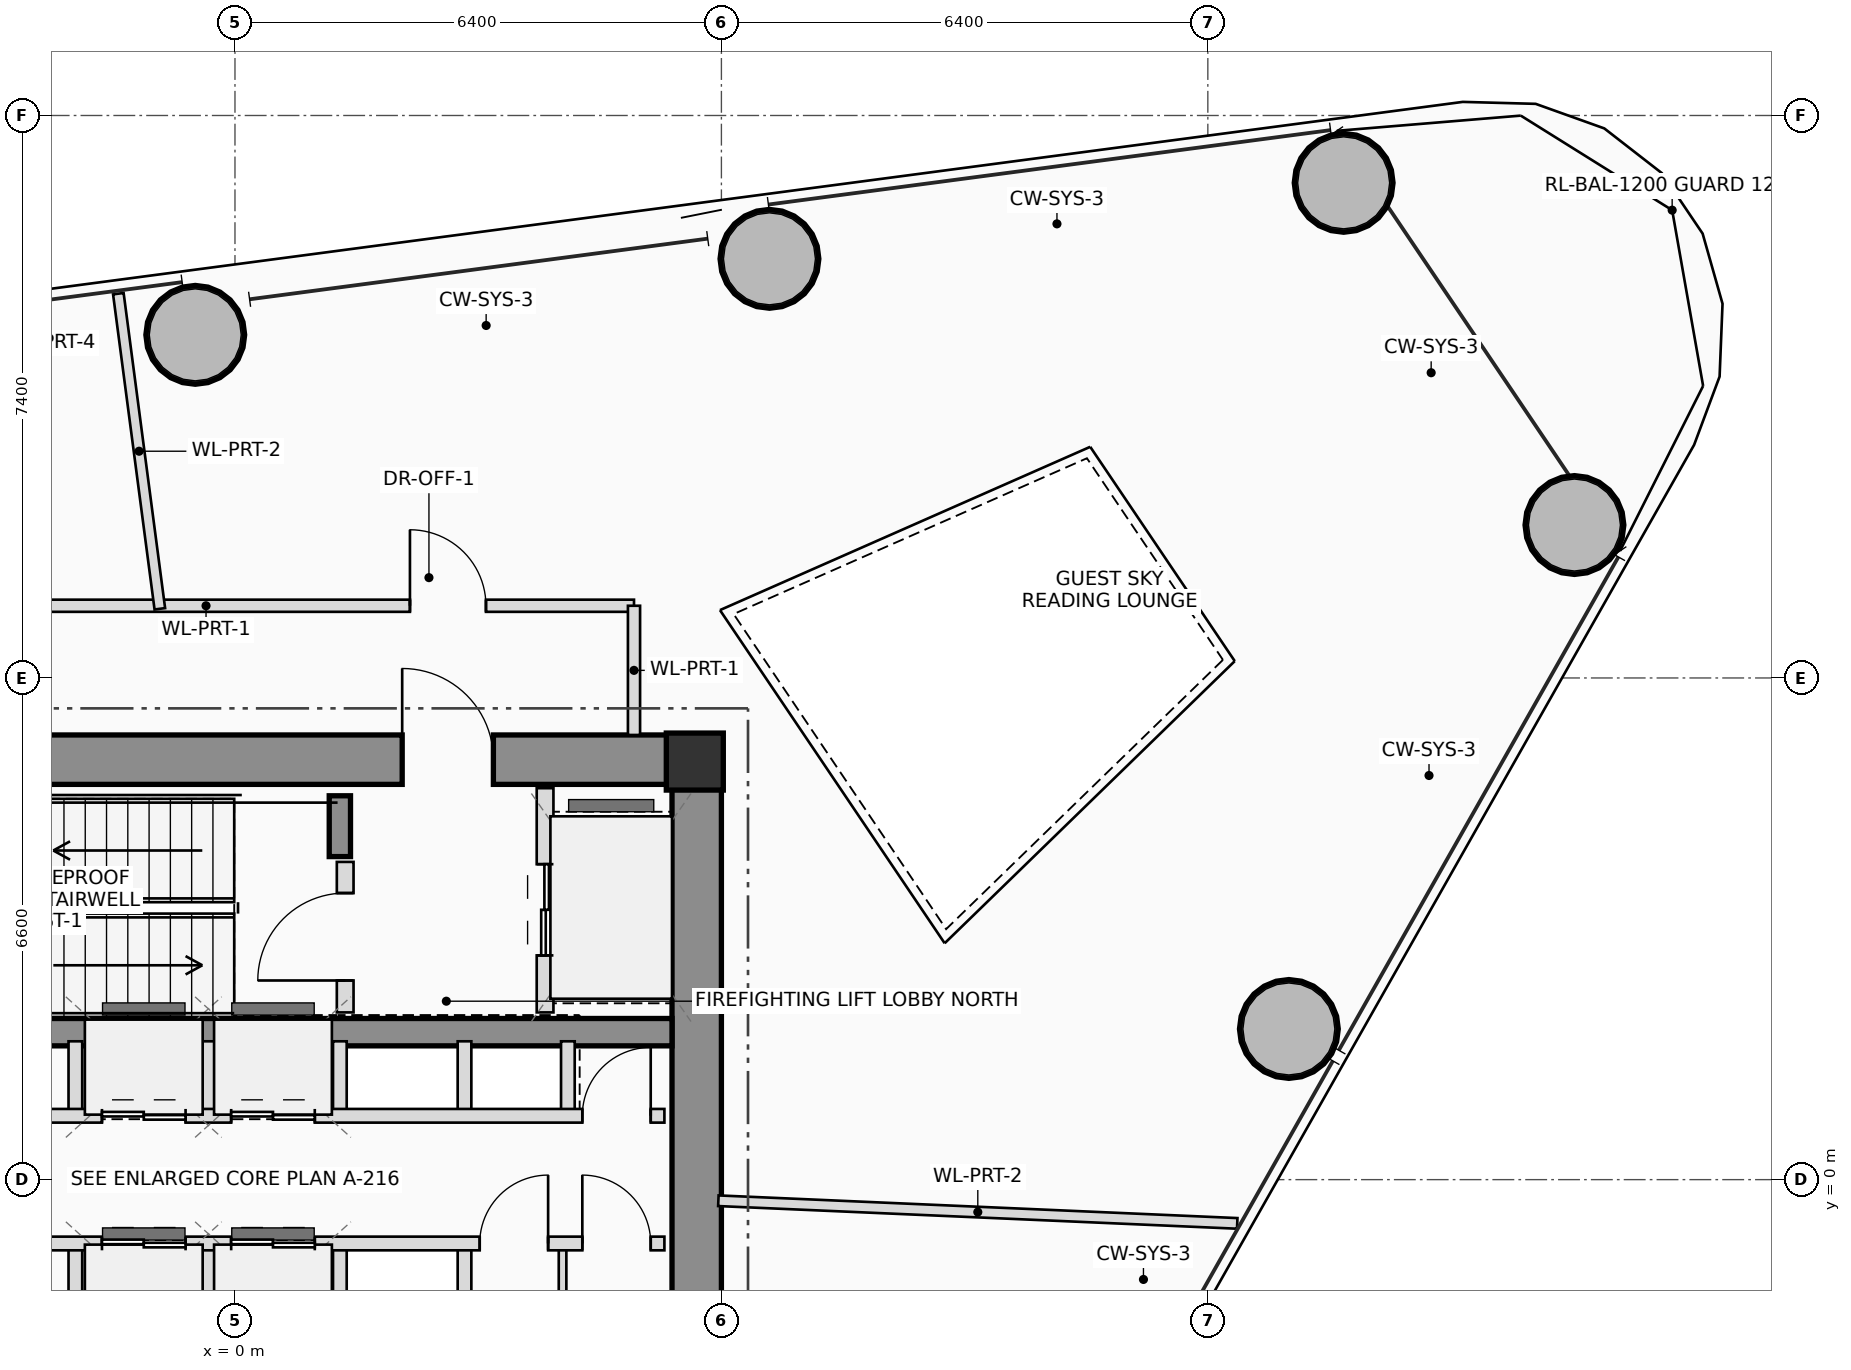
"""IFC4 building model, lengths in metres.
Left out: names, types, materials, properties, quantities, classifications, styles, units other than length and angle.
Written with IfcOpenShell. Run it as: python <this file> out.ifc"""

import sys

from ifc_helpers import new_model, si_unit, direction, frame, frame_2d, origin, origin_2d, place, context, subcontext, project, spatial, rectangle, hollow_circle, extrude, source, transform, mapped, element, fill, save


model = new_model("IFC4")
c1 = context("Model", 3, precision=1e-05, world=origin(), true_north=direction((0.0, 1.0)))
c2 = subcontext(c1, "Body", "Model", "MODEL_VIEW")
j1 = project(units=[si_unit("LENGTHUNIT", "METRE"), si_unit("PLANEANGLEUNIT", "RADIAN")], contexts=[c1])
p1 = place(None, origin())
s1 = spatial("IfcSite", under=j1, at=p1, CompositionType="ELEMENT")
p2 = place(p1, origin())
s2 = spatial("IfcBuilding", under=s1, at=p2, CompositionType="ELEMENT")
p3 = place(p2, frame((0.0, 0.0, 176.0)))
s3 = spatial("IfcBuildingStorey", under=s2, at=p3, CompositionType="ELEMENT", Elevation=176.0)
m1 = source(origin(), c2, "Body", "SweptSolid", [
    extrude(rectangle(XDim=0.75, YDim=0.75, at=origin_2d()), origin(), (0.0, 0.0, 1.0), 3.45),
])
p4 = place(p3, frame((6.05, 5.5, 0.0), z_axis=(0.0, 0.0, 1.0), x_axis=(1.0, 0.0, 0.0)))
e1 = element("IfcColumn", 1, at=p4, inside=s3, PredefinedType="COLUMN", context=c2, shape_type="MappedRepresentation", body=[
    mapped(m1, transform((0.0, 0.0, 0.0), scale=1.0)),
])
p5 = place(p3, frame((-6.4, 5.525, 0.0), z_axis=(0.0, 0.0, 1.0), x_axis=(1.0, 0.0, 0.0)))
e2 = element("IfcWall", 2, at=p5, inside=s3, PredefinedType="SHEAR", context=c2, shape_type="SweptSolid", body=[
    extrude(rectangle(XDim=12.8, YDim=0.65, at=frame_2d((6.4, 0.0))), origin(), (0.0, 0.0, 1.0), 3.45),
])
p6 = place(p5, frame((8.6, 0.0, 0.0)))
e3 = element("IfcOpeningElement", 3, at=p6, cuts=e2, PredefinedType="OPENING", context=c2, shape_type="SweptSolid", body=[
    extrude(rectangle(XDim=1.2, YDim=2.2, at=frame_2d((0.6, 1.1))), frame((0.0, 0.335, 0.0), z_axis=(0.0, -1.0, 0.0), x_axis=(1.0, 0.0, 0.0)), (0.0, 0.0, 1.0), 0.67),
])
p7 = place(p3, frame((6.075, -5.2, 0.0), z_axis=(0.0, 0.0, 1.0), x_axis=(0.0, 1.0, 0.0)))
e4 = element("IfcWall", 4, at=p7, inside=s3, PredefinedType="SHEAR", context=c2, shape_type="SweptSolid", body=[
    extrude(rectangle(XDim=10.4, YDim=0.65, at=frame_2d((5.2, 0.0))), origin(), (0.0, 0.0, 1.0), 3.45),
])
p8 = place(p3, frame((-5.75, 1.94, 0.0), z_axis=(0.0, 0.0, 1.0), x_axis=(1.0, 0.0, 0.0)))
e5 = element("IfcWall", 5, at=p8, inside=s3, PredefinedType="SHEAR", context=c2, shape_type="SweptSolid", body=[
    extrude(rectangle(XDim=11.5, YDim=0.36, at=frame_2d((5.75, 0.0))), origin(), (0.0, 0.0, 1.0), 3.45),
])
p9 = place(p3, frame((1.38, 4.25, 0.0), z_axis=(0.0, 0.0, 1.0), x_axis=(0.0, 1.0, 0.0)))
e6 = element("IfcWall", 6, at=p9, inside=s3, PredefinedType="SHEAR", context=c2, shape_type="SweptSolid", body=[
    extrude(rectangle(XDim=0.8, YDim=0.28, at=frame_2d((0.4, 0.0))), origin(), (0.0, 0.0, 1.0), 3.45),
])
m2 = source(origin(), c2, "Body", "SweptSolid", [
    extrude(hollow_circle(Radius=0.65, WallThickness=0.045, at=origin_2d()), origin(), (0.0, 0.0, 1.0), 3.45),
])
for number, where, z_axis, x_axis in (
    (7, (13.866, 1.982, 0.0), (0.0, 0.0, 1.0), (1.0, 0.0, 0.0)),
    (8, (17.624, 8.612, 0.0), (0.0, 0.0, 1.0), (1.0, 0.0, 0.0)),
    (9, (14.587, 13.114, 0.0), (0.0, 0.0, 1.0), (1.0, 0.0, 0.0)),
    (10, (7.032, 12.114, 0.0), (0.0, 0.0, 1.0), (1.0, 0.0, 0.0)),
    (11, (-0.522, 11.114, 0.0), (0.0, 0.0, 1.0), (1.0, 0.0, 0.0)),
):
    element("IfcColumn", number, at=place(p3, frame(where, z_axis=z_axis, x_axis=x_axis)), inside=s3, PredefinedType="COLUMN", context=c2, shape_type="MappedRepresentation", body=[
        mapped(m2, transform((0.0, 0.0, 0.0), scale=1.0)),
    ])
p10 = place(p3, frame((1.45, 2.2, 0.0), z_axis=(0.0, 0.0, 1.0), x_axis=(0.0, 1.0, 0.0)))
e12 = element("IfcWall", 12, at=p10, inside=s3, PredefinedType="PLUMBINGWALL", context=c2, shape_type="SweptSolid", body=[
    extrude(rectangle(XDim=1.98, YDim=0.22, at=frame_2d((0.99, 0.0))), origin(), (0.0, 0.0, 1.0), 3.25),
])
p11 = place(p10, frame((0.42, 0.0, 0.0)))
e13 = element("IfcOpeningElement", 13, at=p11, cuts=e12, PredefinedType="OPENING", context=c2, shape_type="SweptSolid", body=[
    extrude(rectangle(XDim=1.15, YDim=2.15, at=frame_2d((0.575, 1.075))), frame((0.0, 0.12, 0.0), z_axis=(0.0, -1.0, 0.0), x_axis=(1.0, 0.0, 0.0)), (0.0, 0.0, 1.0), 0.24),
])
p12 = place(p3, frame((4.08, 2.2, 0.0), z_axis=(0.0, 0.0, 1.0), x_axis=(0.0, 1.0, 0.0)))
e14 = element("IfcWall", 14, at=p12, inside=s3, PredefinedType="PLUMBINGWALL", context=c2, shape_type="SweptSolid", body=[
    extrude(rectangle(XDim=2.95, YDim=0.22, at=frame_2d((1.475, 0.0))), origin(), (0.0, 0.0, 1.0), 3.25),
])
p13 = place(p12, frame((0.75, 0.0, 0.0)))
e15 = element("IfcOpeningElement", 15, at=p13, cuts=e14, PredefinedType="OPENING", context=c2, shape_type="SweptSolid", body=[
    extrude(rectangle(XDim=1.2, YDim=2.25, at=frame_2d((0.6, 1.125))), frame((0.0, 0.12, 0.0), z_axis=(0.0, -1.0, 0.0), x_axis=(1.0, 0.0, 0.0)), (0.0, 0.0, 1.0), 0.24),
])
for number, where, z_axis, x_axis in (
    (16, (-2.1, 0.84, 0.0), (0.0, 0.0, 1.0), (0.0, 1.0, 0.0)),
    (17, (-2.1, -1.82, 0.0), (0.0, 0.0, 1.0), (0.0, 1.0, 0.0)),
    (18, (-0.35, 0.84, 0.0), (0.0, 0.0, 1.0), (0.0, 1.0, 0.0)),
    (19, (-0.35, -1.82, 0.0), (0.0, 0.0, 1.0), (0.0, 1.0, 0.0)),
    (20, (1.38, 0.84, 0.0), (0.0, 0.0, 1.0), (0.0, 1.0, 0.0)),
    (21, (1.38, -1.82, 0.0), (0.0, 0.0, 1.0), (0.0, 1.0, 0.0)),
    (22, (3.02, 0.84, 0.0), (0.0, 0.0, 1.0), (0.0, 1.0, 0.0)),
    (23, (4.38, 0.84, 0.0), (0.0, 0.0, 1.0), (0.0, 1.0, 0.0)),
    (24, (3.02, -1.82, 0.0), (0.0, 0.0, 1.0), (0.0, 1.0, 0.0)),
):
    element("IfcWall", number, at=place(p3, frame(where, z_axis=z_axis, x_axis=x_axis)), inside=s3, PredefinedType="PLUMBINGWALL", context=c2, shape_type="SweptSolid", body=[
        extrude(rectangle(XDim=0.98, YDim=0.18, at=frame_2d((0.49, 0.0))), origin(), (0.0, 0.0, 1.0), 3.25),
    ])
p14 = place(p3, frame((4.31, -1.82, 0.0), z_axis=(0.0, 0.0, 1.0), x_axis=(0.0, 1.0, 0.0)))
e25 = element("IfcWall", 25, at=p14, inside=s3, PredefinedType="PARTITIONING", context=c2, shape_type="SweptSolid", body=[
    extrude(rectangle(XDim=0.98, YDim=0.1, at=frame_2d((0.49, 0.0))), origin(), (0.0, 0.0, 1.0), 3.25),
])
p15 = place(p3, frame((-5.68, 0.84, 0.0), z_axis=(0.0, 0.0, 1.0), x_axis=(1.0, 0.0, 0.0)))
e26 = element("IfcWall", 26, at=p15, inside=s3, PredefinedType="PLUMBINGWALL", context=c2, shape_type="SweptSolid", body=[
    extrude(rectangle(XDim=11.33, YDim=0.18, at=frame_2d((5.665, 0.0))), origin(), (0.0, 0.0, 1.0), 3.25),
])
p16 = place(p15, frame((1.58, 0.0, 0.0)))
e27 = element("IfcOpeningElement", 27, at=p16, cuts=e26, PredefinedType="OPENING", context=c2, shape_type="SweptSolid", body=[
    extrude(rectangle(XDim=0.92, YDim=2.1, at=frame_2d((0.46, 1.05))), frame((0.0, 0.1, 0.0), z_axis=(0.0, -1.0, 0.0), x_axis=(1.0, 0.0, 0.0)), (0.0, 0.0, 1.0), 0.2),
])
p17 = place(p15, frame((3.93, 0.0, 0.0)))
e28 = element("IfcOpeningElement", 28, at=p17, cuts=e26, PredefinedType="OPENING", context=c2, shape_type="SweptSolid", body=[
    extrude(rectangle(XDim=1.1, YDim=2.2, at=frame_2d((0.55, 1.1))), frame((0.0, 0.1, 0.0), z_axis=(0.0, -1.0, 0.0), x_axis=(1.0, 0.0, 0.0)), (0.0, 0.0, 1.0), 0.2),
])
p18 = place(p15, frame((5.63, 0.0, 0.0)))
e29 = element("IfcOpeningElement", 29, at=p18, cuts=e26, PredefinedType="OPENING", context=c2, shape_type="SweptSolid", body=[
    extrude(rectangle(XDim=1.1, YDim=2.2, at=frame_2d((0.55, 1.1))), frame((0.0, 0.1, 0.0), z_axis=(0.0, -1.0, 0.0), x_axis=(1.0, 0.0, 0.0)), (0.0, 0.0, 1.0), 0.2),
])
p19 = place(p15, frame((10.25, 0.0, 0.0)))
e30 = element("IfcOpeningElement", 30, at=p19, cuts=e26, PredefinedType="OPENING", context=c2, shape_type="SweptSolid", body=[
    extrude(rectangle(XDim=0.9, YDim=2.05, at=frame_2d((0.45, 1.025))), frame((0.0, 0.1, 0.0), z_axis=(0.0, -1.0, 0.0), x_axis=(1.0, 0.0, 0.0)), (0.0, 0.0, 1.0), 0.2),
])
p20 = place(p3, frame((-5.68, -0.84, 0.0), z_axis=(0.0, 0.0, 1.0), x_axis=(1.0, 0.0, 0.0)))
e31 = element("IfcWall", 31, at=p20, inside=s3, PredefinedType="PLUMBINGWALL", context=c2, shape_type="SweptSolid", body=[
    extrude(rectangle(XDim=11.33, YDim=0.18, at=frame_2d((5.665, 0.0))), origin(), (0.0, 0.0, 1.0), 3.25),
])
p21 = place(p20, frame((1.18, 0.0, 0.0)))
e32 = element("IfcOpeningElement", 32, at=p21, cuts=e31, PredefinedType="OPENING", context=c2, shape_type="SweptSolid", body=[
    extrude(rectangle(XDim=0.9, YDim=2.05, at=frame_2d((0.45, 1.025))), frame((0.0, 0.1, 0.0), z_axis=(0.0, -1.0, 0.0), x_axis=(1.0, 0.0, 0.0)), (0.0, 0.0, 1.0), 0.2),
])
p22 = place(p20, frame((3.93, 0.0, 0.0)))
e33 = element("IfcOpeningElement", 33, at=p22, cuts=e31, PredefinedType="OPENING", context=c2, shape_type="SweptSolid", body=[
    extrude(rectangle(XDim=1.1, YDim=2.2, at=frame_2d((0.55, 1.1))), frame((0.0, 0.1, 0.0), z_axis=(0.0, -1.0, 0.0), x_axis=(1.0, 0.0, 0.0)), (0.0, 0.0, 1.0), 0.2),
])
p23 = place(p20, frame((5.63, 0.0, 0.0)))
e34 = element("IfcOpeningElement", 34, at=p23, cuts=e31, PredefinedType="OPENING", context=c2, shape_type="SweptSolid", body=[
    extrude(rectangle(XDim=1.1, YDim=2.2, at=frame_2d((0.55, 1.1))), frame((0.0, 0.1, 0.0), z_axis=(0.0, -1.0, 0.0), x_axis=(1.0, 0.0, 0.0)), (0.0, 0.0, 1.0), 0.2),
])
p24 = place(p20, frame((8.9, 0.0, 0.0)))
e35 = element("IfcOpeningElement", 35, at=p24, cuts=e31, PredefinedType="OPENING", context=c2, shape_type="SweptSolid", body=[
    extrude(rectangle(XDim=0.9, YDim=2.05, at=frame_2d((0.45, 1.025))), frame((0.0, 0.1, 0.0), z_axis=(0.0, -1.0, 0.0), x_axis=(1.0, 0.0, 0.0)), (0.0, 0.0, 1.0), 0.2),
])
p25 = place(p20, frame((10.25, 0.0, 0.0)))
e36 = element("IfcOpeningElement", 36, at=p25, cuts=e31, PredefinedType="OPENING", context=c2, shape_type="SweptSolid", body=[
    extrude(rectangle(XDim=0.9, YDim=2.05, at=frame_2d((0.45, 1.025))), frame((0.0, 0.1, 0.0), z_axis=(0.0, -1.0, 0.0), x_axis=(1.0, 0.0, 0.0)), (0.0, 0.0, 1.0), 0.2),
])
p26 = place(p3, frame((-6.36, 7.55, 0.0), z_axis=(0.0, 0.0, 1.0), x_axis=(1.0, 0.0, 0.0)))
e37 = element("IfcWall", 37, at=p26, inside=s3, PredefinedType="PARTITIONING", context=c2, shape_type="SweptSolid", body=[
    extrude(rectangle(XDim=11.61, YDim=0.16, at=frame_2d((5.805, 0.0))), origin(), (0.0, 0.0, 1.0), 2.605),
])
p27 = place(p26, frame((2.246, 0.0, 0.0)))
e38 = element("IfcOpeningElement", 38, at=p27, cuts=e37, PredefinedType="OPENING", context=c2, shape_type="SweptSolid", body=[
    extrude(rectangle(XDim=1.05, YDim=2.2, at=frame_2d((0.525, 1.1))), frame((0.0, 0.09, 0.0), z_axis=(0.0, -1.0, 0.0), x_axis=(1.0, 0.0, 0.0)), (0.0, 0.0, 1.0), 0.18),
])
p28 = place(p26, frame((8.662, 0.0, 0.0)))
e39 = element("IfcOpeningElement", 39, at=p28, cuts=e37, PredefinedType="OPENING", context=c2, shape_type="SweptSolid", body=[
    extrude(rectangle(XDim=1.0, YDim=2.25, at=frame_2d((0.5, 1.125))), frame((0.0, 0.09, 0.0), z_axis=(0.0, -1.0, 0.0), x_axis=(1.0, 0.0, 0.0)), (0.0, 0.0, 1.0), 0.18),
])
p29 = place(p3, frame((5.25, 7.55, 0.0), z_axis=(0.0, 0.0, 1.0), x_axis=(0.0, -1.0, 0.0)))
e40 = element("IfcWall", 40, at=p29, inside=s3, PredefinedType="PARTITIONING", context=c2, shape_type="SweptSolid", body=[
    extrude(rectangle(XDim=1.7, YDim=0.16, at=frame_2d((0.85, 0.0))), origin(), (0.0, 0.0, 1.0), 3.25),
])
p30 = place(p3, frame((6.36, -0.278, 0.0), z_axis=(0.0, 0.0, 1.0), x_axis=(0.999047983793, -0.043624833281, 0.0)))
e41 = element("IfcWall", 41, at=p30, inside=s3, PredefinedType="PARTITIONING", context=c2, shape_type="SweptSolid", body=[
    extrude(rectangle(XDim=6.833, YDim=0.14, at=frame_2d((3.417, 0.0))), origin(), (0.0, 0.0, 1.0), 2.605),
])
p31 = place(p3, frame((-0.989, 7.51, 0.0), z_axis=(0.0, 0.0, 1.0), x_axis=(-0.130484717168, 0.991450320785, 0.0)))
e42 = element("IfcWall", 42, at=p31, inside=s3, PredefinedType="PARTITIONING", context=c2, shape_type="SweptSolid", body=[
    extrude(rectangle(XDim=4.182, YDim=0.14, at=frame_2d((2.091, 0.0))), origin(), (0.0, 0.0, 1.0), 2.605),
])
p32 = place(p6, origin())
e43 = element("IfcDoor", 43, at=p32, inside=s3, OperationType="SINGLE_SWING_LEFT", PredefinedType="DOOR", context=c2, shape_type="SweptSolid", body=[
    extrude(rectangle(XDim=1.2, YDim=2.2, at=frame_2d((0.6, 1.1))), frame((0.0, 0.025, 0.0), z_axis=(0.0, -1.0, 0.0), x_axis=(1.0, 0.0, 0.0)), (0.0, 0.0, 1.0), 0.05),
])
fill(e3, e43)
p33 = place(p11, origin())
e44 = element("IfcDoor", 44, at=p33, inside=s3, OperationType="SINGLE_SWING_LEFT", PredefinedType="DOOR", context=c2, shape_type="SweptSolid", body=[
    extrude(rectangle(XDim=1.15, YDim=2.15, at=frame_2d((0.575, 1.075))), frame((0.0, 0.025, 0.0), z_axis=(0.0, -1.0, 0.0), x_axis=(1.0, 0.0, 0.0)), (0.0, 0.0, 1.0), 0.05),
])
fill(e13, e44)
p34 = place(p13, origin())
e45 = element("IfcDoor", 45, at=p34, inside=s3, OperationType="DOUBLE_DOOR_SLIDING", PredefinedType="DOOR", context=c2, shape_type="SweptSolid", body=[
    extrude(rectangle(XDim=1.2, YDim=2.25, at=frame_2d((0.6, 1.125))), frame((0.0, 0.025, 0.0), z_axis=(0.0, -1.0, 0.0), x_axis=(1.0, 0.0, 0.0)), (0.0, 0.0, 1.0), 0.05),
])
fill(e15, e45)
p35 = place(p17, origin())
e46 = element("IfcDoor", 46, at=p35, inside=s3, OperationType="DOUBLE_DOOR_SLIDING", PredefinedType="DOOR", context=c2, shape_type="SweptSolid", body=[
    extrude(rectangle(XDim=1.1, YDim=2.2, at=frame_2d((0.55, 1.1))), frame((0.0, 0.025, 0.0), z_axis=(0.0, -1.0, 0.0), x_axis=(1.0, 0.0, 0.0)), (0.0, 0.0, 1.0), 0.05),
])
fill(e28, e46)
p36 = place(p18, origin())
e47 = element("IfcDoor", 47, at=p36, inside=s3, OperationType="DOUBLE_DOOR_SLIDING", PredefinedType="DOOR", context=c2, shape_type="SweptSolid", body=[
    extrude(rectangle(XDim=1.1, YDim=2.2, at=frame_2d((0.55, 1.1))), frame((0.0, 0.025, 0.0), z_axis=(0.0, -1.0, 0.0), x_axis=(1.0, 0.0, 0.0)), (0.0, 0.0, 1.0), 0.05),
])
fill(e29, e47)
p37 = place(p19, origin())
e48 = element("IfcDoor", 48, at=p37, inside=s3, OperationType="SINGLE_SWING_RIGHT", PredefinedType="DOOR", context=c2, shape_type="SweptSolid", body=[
    extrude(rectangle(XDim=0.9, YDim=2.05, at=frame_2d((0.45, 1.025))), frame((0.0, 0.025, 0.0), z_axis=(0.0, -1.0, 0.0), x_axis=(1.0, 0.0, 0.0)), (0.0, 0.0, 1.0), 0.05),
])
fill(e30, e48)
p38 = place(p22, origin())
e49 = element("IfcDoor", 49, at=p38, inside=s3, OperationType="DOUBLE_DOOR_SLIDING", PredefinedType="DOOR", context=c2, shape_type="SweptSolid", body=[
    extrude(rectangle(XDim=1.1, YDim=2.2, at=frame_2d((0.55, 1.1))), frame((0.0, 0.025, 0.0), z_axis=(0.0, -1.0, 0.0), x_axis=(1.0, 0.0, 0.0)), (0.0, 0.0, 1.0), 0.05),
])
fill(e33, e49)
p39 = place(p23, origin())
e50 = element("IfcDoor", 50, at=p39, inside=s3, OperationType="DOUBLE_DOOR_SLIDING", PredefinedType="DOOR", context=c2, shape_type="SweptSolid", body=[
    extrude(rectangle(XDim=1.1, YDim=2.2, at=frame_2d((0.55, 1.1))), frame((0.0, 0.025, 0.0), z_axis=(0.0, -1.0, 0.0), x_axis=(1.0, 0.0, 0.0)), (0.0, 0.0, 1.0), 0.05),
])
fill(e34, e50)
p40 = place(p24, origin())
e51 = element("IfcDoor", 51, at=p40, inside=s3, OperationType="SINGLE_SWING_RIGHT", PredefinedType="DOOR", context=c2, shape_type="SweptSolid", body=[
    extrude(rectangle(XDim=0.9, YDim=2.05, at=frame_2d((0.45, 1.025))), frame((0.0, 0.025, 0.0), z_axis=(0.0, -1.0, 0.0), x_axis=(1.0, 0.0, 0.0)), (0.0, 0.0, 1.0), 0.05),
])
fill(e35, e51)
p41 = place(p25, origin())
e52 = element("IfcDoor", 52, at=p41, inside=s3, OperationType="SINGLE_SWING_LEFT", PredefinedType="DOOR", context=c2, shape_type="SweptSolid", body=[
    extrude(rectangle(XDim=0.9, YDim=2.05, at=frame_2d((0.45, 1.025))), frame((0.0, 0.025, 0.0), z_axis=(0.0, -1.0, 0.0), x_axis=(1.0, 0.0, 0.0)), (0.0, 0.0, 1.0), 0.05),
])
fill(e36, e52)
p42 = place(p28, origin())
e53 = element("IfcDoor", 53, at=p42, inside=s3, OperationType="SINGLE_SWING_LEFT", PredefinedType="DOOR", context=c2, shape_type="SweptSolid", body=[
    extrude(rectangle(XDim=1.0, YDim=2.25, at=frame_2d((0.5, 1.125))), frame((0.0, 0.025, 0.0), z_axis=(0.0, -1.0, 0.0), x_axis=(1.0, 0.0, 0.0)), (0.0, 0.0, 1.0), 0.05),
])
fill(e39, e53)
save(model, sys.argv[1])
